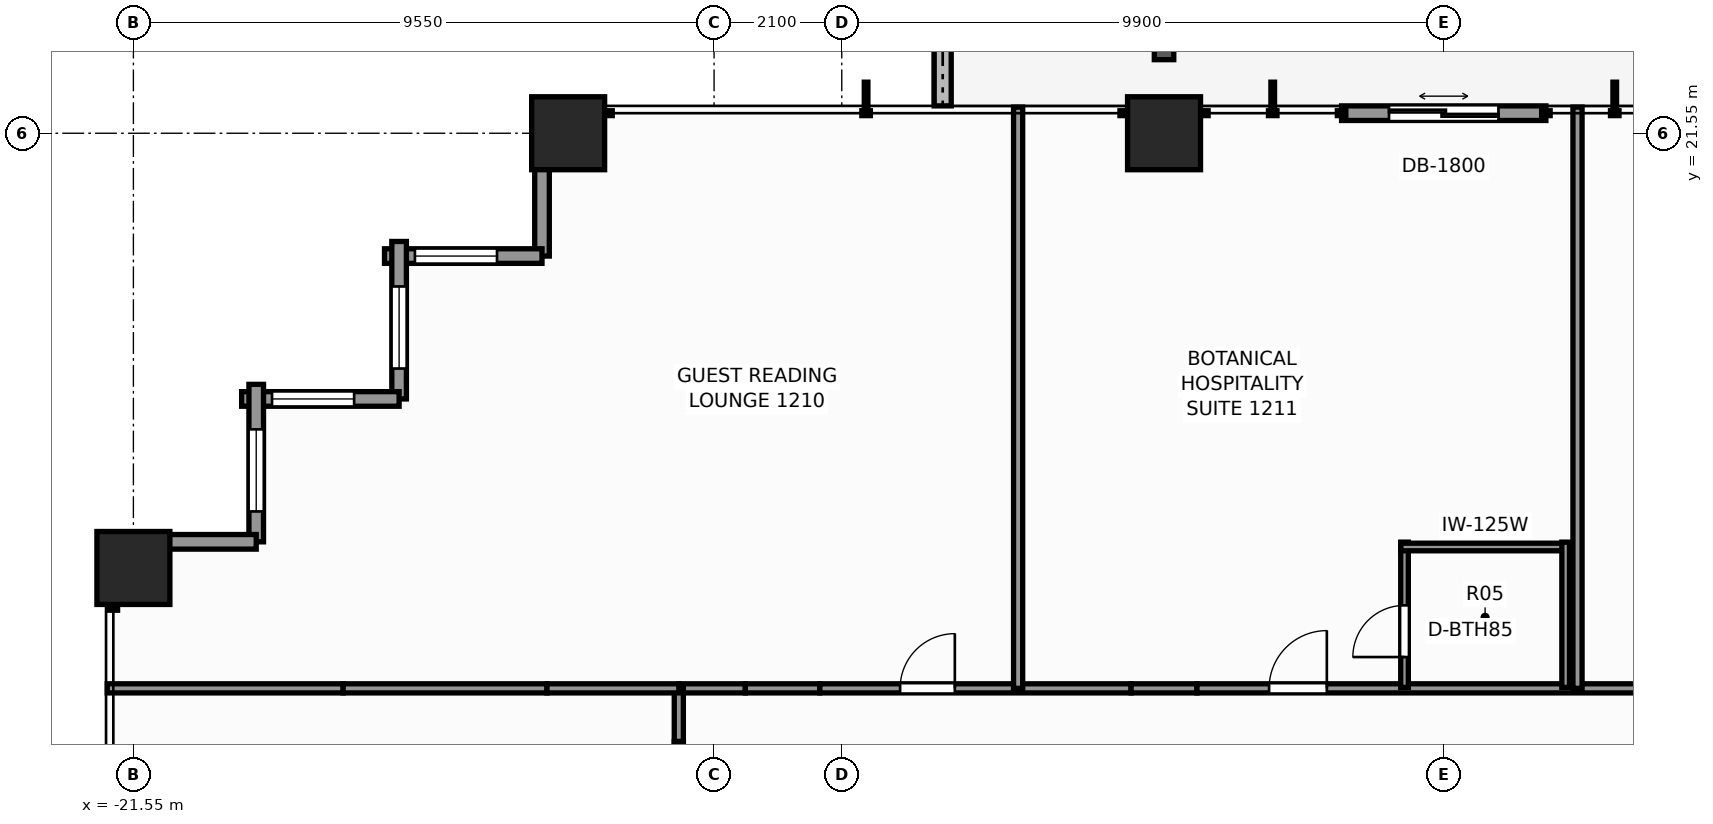
"""IFC4 building model, lengths in metres.
Left out: names, types, materials, properties, quantities, classifications, styles, units other than length and angle.
Written with IfcOpenShell. Run it as: python <this file> out.ifc"""

import sys

from ifc_helpers import new_model, si_unit, direction, frame, frame_2d, origin, origin_2d, place, context, subcontext, project, spatial, rectangle, extrude, element, fill, save


model = new_model("IFC4")
c1 = context("Model", 3, precision=1e-05, world=origin(), true_north=direction((0.0, 1.0)))
c2 = subcontext(c1, "Body", "Model", "MODEL_VIEW")
j1 = project(units=[si_unit("LENGTHUNIT", "METRE"), si_unit("PLANEANGLEUNIT", "RADIAN")], contexts=[c1])
p1 = place(None, origin())
s1 = spatial("IfcSite", under=j1, at=p1, CompositionType="ELEMENT")
p2 = place(p1, origin())
s2 = spatial("IfcBuilding", under=s1, at=p2, CompositionType="ELEMENT")
p3 = place(p2, frame((0.0, 0.0, 43.6)))
s3 = spatial("IfcBuildingStorey", under=s2, at=p3, CompositionType="ELEMENT", Elevation=43.6)
for number, where, z_axis, x_axis in (
    (1, (-14.4, 21.55, 0.0), (0.0, 0.0, 1.0), (1.0, 0.0, 0.0)),
    (2, (-4.6, 21.55, 0.0), (0.0, 0.0, 1.0), (1.0, 0.0, 0.0)),
    (3, (-21.55, 14.4, 0.0), (0.0, 0.0, 1.0), (1.0, 0.0, 0.0)),
):
    element("IfcColumn", number, at=place(p3, frame(where, z_axis=z_axis, x_axis=x_axis)), inside=s3, PredefinedType="COLUMN", context=c2, shape_type="SweptSolid", body=[
        extrude(rectangle(XDim=1.2, YDim=1.2, at=origin_2d()), origin(), (0.0, 0.0, 1.0), 3.3),
    ])
p4 = place(p3, frame((-8.24, 24.975, -0.06), z_axis=(0.0, 0.0, 1.0), x_axis=(0.0, -1.0, 0.0)))
e4 = element("IfcWall", 4, at=p4, inside=s3, PredefinedType="PARAPET", context=c2, shape_type="SweptSolid", body=[
    extrude(rectangle(XDim=2.975, YDim=0.28, at=frame_2d((1.487, 0.0))), origin(), (0.0, 0.0, 1.0), 0.42),
])
p5 = place(p3, frame((-1.68, 21.88, 0.0), z_axis=(0.0, 0.0, 1.0), x_axis=(1.0, 0.0, 0.0)))
e5 = element("IfcWall", 5, at=p5, inside=s3, PredefinedType="STANDARD", context=c2, shape_type="SweptSolid", body=[
    extrude(rectangle(XDim=3.36, YDim=0.24, at=frame_2d((1.68, 0.0))), origin(), (0.0, 0.0, 1.0), 3.06),
])
p6 = place(p5, frame((0.78, 0.0, 0.0)))
e6 = element("IfcOpeningElement", 6, at=p6, cuts=e5, PredefinedType="OPENING", context=c2, shape_type="SweptSolid", body=[
    extrude(rectangle(XDim=1.8, YDim=2.2, at=frame_2d((0.9, 1.1))), frame((0.0, 0.13, 0.0), z_axis=(0.0, -1.0, 0.0), x_axis=(1.0, 0.0, 0.0)), (0.0, 0.0, 1.0), 0.26),
])
p7 = place(p3, frame((-14.83, 19.53, 0.0), z_axis=(0.0, 0.0, 1.0), x_axis=(0.0, 1.0, 0.0)))
e7 = element("IfcWall", 7, at=p7, inside=s3, PredefinedType="STANDARD", context=c2, shape_type="SweptSolid", body=[
    extrude(rectangle(XDim=2.59, YDim=0.24, at=frame_2d((1.295, 0.0))), origin(), (0.0, 0.0, 1.0), 1.555),
])
p8 = place(p3, frame((-17.42, 19.53, 0.0), z_axis=(0.0, 0.0, 1.0), x_axis=(1.0, 0.0, 0.0)))
e8 = element("IfcWall", 8, at=p8, inside=s3, PredefinedType="STANDARD", context=c2, shape_type="SweptSolid", body=[
    extrude(rectangle(XDim=2.59, YDim=0.24, at=frame_2d((1.295, 0.0))), origin(), (0.0, 0.0, 1.0), 2.439),
])
p9 = place(p8, frame((0.5, 0.0, 0.65)))
e9 = element("IfcOpeningElement", 9, at=p9, cuts=e8, PredefinedType="OPENING", context=c2, shape_type="SweptSolid", body=[
    extrude(rectangle(XDim=1.35, YDim=1.55, at=frame_2d((0.675, 0.775))), frame((0.0, 0.13, 0.0), z_axis=(0.0, -1.0, 0.0), x_axis=(1.0, 0.0, 0.0)), (0.0, 0.0, 1.0), 0.26),
])
p10 = place(p3, frame((-17.18, 17.18, 0.0), z_axis=(0.0, 0.0, 1.0), x_axis=(0.0, 1.0, 0.0)))
e10 = element("IfcWall", 10, at=p10, inside=s3, PredefinedType="STANDARD", context=c2, shape_type="SweptSolid", body=[
    extrude(rectangle(XDim=2.59, YDim=0.24, at=frame_2d((1.295, 0.0))), origin(), (0.0, 0.0, 1.0), 2.439),
])
p11 = place(p10, frame((0.5, 0.0, 0.65)))
e11 = element("IfcOpeningElement", 11, at=p11, cuts=e10, PredefinedType="OPENING", context=c2, shape_type="SweptSolid", body=[
    extrude(rectangle(XDim=1.35, YDim=1.55, at=frame_2d((0.675, 0.775))), frame((0.0, 0.13, 0.0), z_axis=(0.0, -1.0, 0.0), x_axis=(1.0, 0.0, 0.0)), (0.0, 0.0, 1.0), 0.26),
])
p12 = place(p3, frame((-19.77, 17.18, 0.0), z_axis=(0.0, 0.0, 1.0), x_axis=(1.0, 0.0, 0.0)))
e12 = element("IfcWall", 12, at=p12, inside=s3, PredefinedType="STANDARD", context=c2, shape_type="SweptSolid", body=[
    extrude(rectangle(XDim=2.59, YDim=0.24, at=frame_2d((1.295, 0.0))), origin(), (0.0, 0.0, 1.0), 2.439),
])
p13 = place(p12, frame((0.5, 0.0, 0.65)))
e13 = element("IfcOpeningElement", 13, at=p13, cuts=e12, PredefinedType="OPENING", context=c2, shape_type="SweptSolid", body=[
    extrude(rectangle(XDim=1.35, YDim=1.55, at=frame_2d((0.675, 0.775))), frame((0.0, 0.13, 0.0), z_axis=(0.0, -1.0, 0.0), x_axis=(1.0, 0.0, 0.0)), (0.0, 0.0, 1.0), 0.26),
])
p14 = place(p3, frame((-19.53, 14.83, 0.0), z_axis=(0.0, 0.0, 1.0), x_axis=(0.0, 1.0, 0.0)))
e14 = element("IfcWall", 14, at=p14, inside=s3, PredefinedType="STANDARD", context=c2, shape_type="SweptSolid", body=[
    extrude(rectangle(XDim=2.59, YDim=0.24, at=frame_2d((1.295, 0.0))), origin(), (0.0, 0.0, 1.0), 2.439),
])
p15 = place(p14, frame((0.5, 0.0, 0.65)))
e15 = element("IfcOpeningElement", 15, at=p15, cuts=e14, PredefinedType="OPENING", context=c2, shape_type="SweptSolid", body=[
    extrude(rectangle(XDim=1.35, YDim=1.55, at=frame_2d((0.675, 0.775))), frame((0.0, 0.13, 0.0), z_axis=(0.0, -1.0, 0.0), x_axis=(1.0, 0.0, 0.0)), (0.0, 0.0, 1.0), 0.26),
])
p16 = place(p3, frame((-22.12, 14.83, 0.0), z_axis=(0.0, 0.0, 1.0), x_axis=(1.0, 0.0, 0.0)))
e16 = element("IfcWall", 16, at=p16, inside=s3, PredefinedType="STANDARD", context=c2, shape_type="SweptSolid", body=[
    extrude(rectangle(XDim=2.59, YDim=0.24, at=frame_2d((1.295, 0.0))), origin(), (0.0, 0.0, 1.0), 1.555),
])
p17 = place(p3, frame((-12.58, 12.42, 0.0), z_axis=(0.0, 0.0, 1.0), x_axis=(1.0, 0.0, 0.0)))
e17 = element("IfcWall", 17, at=p17, inside=s3, PredefinedType="PARTITIONING", context=c2, shape_type="SweptSolid", body=[
    extrude(rectangle(XDim=1.094, YDim=0.15, at=frame_2d((0.547, 0.0))), origin(), (0.0, 0.0, 1.0), 3.06),
])
p18 = place(p3, frame((-11.486, 12.42, 0.0), z_axis=(0.0, 0.0, 1.0), x_axis=(1.0, 0.0, 0.0)))
e18 = element("IfcWall", 18, at=p18, inside=s3, PredefinedType="PARTITIONING", context=c2, shape_type="SweptSolid", body=[
    extrude(rectangle(XDim=1.225, YDim=0.15, at=frame_2d((0.612, 0.0))), origin(), (0.0, 0.0, 1.0), 1.545),
])
p19 = place(p3, frame((-10.261, 12.42, 0.0), z_axis=(0.0, 0.0, 1.0), x_axis=(1.0, 0.0, 0.0)))
e19 = element("IfcWall", 19, at=p19, inside=s3, PredefinedType="PARTITIONING", context=c2, shape_type="SweptSolid", body=[
    extrude(rectangle(XDim=5.119, YDim=0.15, at=frame_2d((2.56, 0.0))), origin(), (0.0, 0.0, 1.0), 3.06),
])
p20 = place(p19, frame((1.32, 0.0, 0.0)))
e20 = element("IfcOpeningElement", 20, at=p20, cuts=e19, PredefinedType="OPENING", context=c2, shape_type="SweptSolid", body=[
    extrude(rectangle(XDim=0.9, YDim=2.06, at=frame_2d((0.45, 1.03))), frame((0.0, 0.085, 0.0), z_axis=(0.0, -1.0, 0.0), x_axis=(1.0, 0.0, 0.0)), (0.0, 0.0, 1.0), 0.17),
])
p21 = place(p3, frame((-5.142, 12.42, 0.0), z_axis=(0.0, 0.0, 1.0), x_axis=(1.0, 0.0, 0.0)))
e21 = element("IfcWall", 21, at=p21, inside=s3, PredefinedType="PARTITIONING", context=c2, shape_type="SweptSolid", body=[
    extrude(rectangle(XDim=1.084, YDim=0.15, at=frame_2d((0.542, 0.0))), origin(), (0.0, 0.0, 1.0), 1.545),
])
p22 = place(p3, frame((-4.058, 12.42, 0.0), z_axis=(0.0, 0.0, 1.0), x_axis=(1.0, 0.0, 0.0)))
e22 = element("IfcWall", 22, at=p22, inside=s3, PredefinedType="PARTITIONING", context=c2, shape_type="SweptSolid", body=[
    extrude(rectangle(XDim=8.116, YDim=0.15, at=frame_2d((4.058, 0.0))), origin(), (0.0, 0.0, 1.0), 2.585),
])
p23 = place(p22, frame((1.186, 0.0, 0.0)))
e23 = element("IfcOpeningElement", 23, at=p23, cuts=e22, PredefinedType="OPENING", context=c2, shape_type="SweptSolid", body=[
    extrude(rectangle(XDim=0.95, YDim=2.06, at=frame_2d((0.475, 1.03))), frame((0.0, 0.085, 0.0), z_axis=(0.0, -1.0, 0.0), x_axis=(1.0, 0.0, 0.0)), (0.0, 0.0, 1.0), 0.17),
])
p24 = place(p3, frame((-12.58, 10.323, 0.0), z_axis=(0.0, 0.0, 1.0), x_axis=(0.0, 1.0, 0.0)))
e24 = element("IfcWall", 24, at=p24, inside=s3, PredefinedType="PARTITIONING", context=c2, shape_type="SweptSolid", body=[
    extrude(rectangle(XDim=1.225, YDim=0.15, at=frame_2d((0.612, 0.0))), origin(), (0.0, 0.0, 1.0), 1.545),
])
p25 = place(p3, frame((-12.58, 11.548, 0.0), z_axis=(0.0, 0.0, 1.0), x_axis=(0.0, 1.0, 0.0)))
e25 = element("IfcWall", 25, at=p25, inside=s3, PredefinedType="PARTITIONING", context=c2, shape_type="SweptSolid", body=[
    extrude(rectangle(XDim=0.872, YDim=0.15, at=frame_2d((0.436, 0.0))), origin(), (0.0, 0.0, 1.0), 3.06),
])
p26 = place(p3, frame((-21.98, 12.42, 0.0), z_axis=(0.0, 0.0, 1.0), x_axis=(1.0, 0.0, 0.0)))
e26 = element("IfcWall", 26, at=p26, inside=s3, PredefinedType="PARTITIONING", context=c2, shape_type="SweptSolid", body=[
    extrude(rectangle(XDim=3.88, YDim=0.15, at=frame_2d((1.94, 0.0))), origin(), (0.0, 0.0, 1.0), 2.429),
])
p27 = place(p3, frame((-18.1, 12.42, 0.0), z_axis=(0.0, 0.0, 1.0), x_axis=(1.0, 0.0, 0.0)))
e27 = element("IfcWall", 27, at=p27, inside=s3, PredefinedType="PARTITIONING", context=c2, shape_type="SweptSolid", body=[
    extrude(rectangle(XDim=3.352, YDim=0.15, at=frame_2d((1.676, 0.0))), origin(), (0.0, 0.0, 1.0), 1.545),
])
p28 = place(p3, frame((-14.748, 12.42, 0.0), z_axis=(0.0, 0.0, 1.0), x_axis=(1.0, 0.0, 0.0)))
e28 = element("IfcWall", 28, at=p28, inside=s3, PredefinedType="PARTITIONING", context=c2, shape_type="SweptSolid", body=[
    extrude(rectangle(XDim=2.168, YDim=0.15, at=frame_2d((1.084, 0.0))), origin(), (0.0, 0.0, 1.0), 3.06),
])
for number, where, z_axis, x_axis in (
    (29, (-7.0, 12.42, 0.0), (0.0, 0.0, 1.0), (0.0, 1.0, 0.0)),
    (30, (2.2, 12.42, 0.0), (0.0, 0.0, 1.0), (0.0, 1.0, 0.0)),
):
    element("IfcWall", number, at=place(p3, frame(where, z_axis=z_axis, x_axis=x_axis)), inside=s3, PredefinedType="PARTITIONING", context=c2, shape_type="SweptSolid", body=[
        extrude(rectangle(XDim=9.56, YDim=0.15, at=frame_2d((4.78, 0.0))), origin(), (0.0, 0.0, 1.0), 2.429),
    ])
p29 = place(p3, frame((-0.645, 12.435, 0.0), z_axis=(0.0, 0.0, 1.0), x_axis=(0.0, 1.0, 0.0)))
e31 = element("IfcWall", 31, at=p29, inside=s3, PredefinedType="PARTITIONING", context=c2, shape_type="SweptSolid", body=[
    extrude(rectangle(XDim=2.39, YDim=0.125, at=frame_2d((1.195, 0.0))), origin(), (0.0, 0.0, 1.0), 3.06),
])
p30 = place(p29, frame((0.5, 0.0, 0.0)))
e32 = element("IfcOpeningElement", 32, at=p30, cuts=e31, PredefinedType="OPENING", context=c2, shape_type="SweptSolid", body=[
    extrude(rectangle(XDim=0.85, YDim=2.03, at=frame_2d((0.425, 1.015))), frame((0.0, 0.073, 0.0), z_axis=(0.0, -1.0, 0.0), x_axis=(1.0, 0.0, 0.0)), (0.0, 0.0, 1.0), 0.145),
])
p31 = place(p3, frame((-0.705, 14.745, 0.0), z_axis=(0.0, 0.0, 1.0), x_axis=(1.0, 0.0, 0.0)))
e33 = element("IfcWall", 33, at=p31, inside=s3, PredefinedType="PARTITIONING", context=c2, shape_type="SweptSolid", body=[
    extrude(rectangle(XDim=2.77, YDim=0.125, at=frame_2d((1.385, 0.0))), origin(), (0.0, 0.0, 1.0), 2.585),
])
p32 = place(p3, frame((2.005, 12.435, 0.0), z_axis=(0.0, 0.0, 1.0), x_axis=(0.0, 1.0, 0.0)))
e34 = element("IfcWall", 34, at=p32, inside=s3, PredefinedType="PARTITIONING", context=c2, shape_type="SweptSolid", body=[
    extrude(rectangle(XDim=2.39, YDim=0.125, at=frame_2d((1.195, 0.0))), origin(), (0.0, 0.0, 1.0), 3.06),
])
p33 = place(p6, origin())
e35 = element("IfcDoor", 35, at=p33, inside=s3, OperationType="DOUBLE_DOOR_SLIDING", PredefinedType="DOOR", context=c2, shape_type="SweptSolid", body=[
    extrude(rectangle(XDim=1.8, YDim=2.2, at=frame_2d((0.9, 1.1))), frame((0.0, 0.025, 0.0), z_axis=(0.0, -1.0, 0.0), x_axis=(1.0, 0.0, 0.0)), (0.0, 0.0, 1.0), 0.05),
])
fill(e6, e35)
p34 = place(p9, origin())
e36 = element("IfcWindow", 36, at=p34, inside=s3, PartitioningType="SINGLE_PANEL", PredefinedType="WINDOW", context=c2, shape_type="SweptSolid", body=[
    extrude(rectangle(XDim=1.35, YDim=1.55, at=frame_2d((0.675, 0.775))), frame((0.0, 0.03, 0.0), z_axis=(0.0, -1.0, 0.0), x_axis=(1.0, 0.0, 0.0)), (0.0, 0.0, 1.0), 0.06),
])
fill(e9, e36)
p35 = place(p11, origin())
e37 = element("IfcWindow", 37, at=p35, inside=s3, PartitioningType="SINGLE_PANEL", PredefinedType="WINDOW", context=c2, shape_type="SweptSolid", body=[
    extrude(rectangle(XDim=1.35, YDim=1.55, at=frame_2d((0.675, 0.775))), frame((0.0, 0.03, 0.0), z_axis=(0.0, -1.0, 0.0), x_axis=(1.0, 0.0, 0.0)), (0.0, 0.0, 1.0), 0.06),
])
fill(e11, e37)
p36 = place(p13, origin())
e38 = element("IfcWindow", 38, at=p36, inside=s3, PartitioningType="SINGLE_PANEL", PredefinedType="WINDOW", context=c2, shape_type="SweptSolid", body=[
    extrude(rectangle(XDim=1.35, YDim=1.55, at=frame_2d((0.675, 0.775))), frame((0.0, 0.03, 0.0), z_axis=(0.0, -1.0, 0.0), x_axis=(1.0, 0.0, 0.0)), (0.0, 0.0, 1.0), 0.06),
])
fill(e13, e38)
p37 = place(p15, origin())
e39 = element("IfcWindow", 39, at=p37, inside=s3, PartitioningType="SINGLE_PANEL", PredefinedType="WINDOW", context=c2, shape_type="SweptSolid", body=[
    extrude(rectangle(XDim=1.35, YDim=1.55, at=frame_2d((0.675, 0.775))), frame((0.0, 0.03, 0.0), z_axis=(0.0, -1.0, 0.0), x_axis=(1.0, 0.0, 0.0)), (0.0, 0.0, 1.0), 0.06),
])
fill(e15, e39)
p38 = place(p20, origin())
e40 = element("IfcDoor", 40, at=p38, inside=s3, OperationType="SINGLE_SWING_RIGHT", PredefinedType="DOOR", context=c2, shape_type="SweptSolid", body=[
    extrude(rectangle(XDim=0.9, YDim=2.06, at=frame_2d((0.45, 1.03))), frame((0.0, 0.025, 0.0), z_axis=(0.0, -1.0, 0.0), x_axis=(1.0, 0.0, 0.0)), (0.0, 0.0, 1.0), 0.05),
])
fill(e20, e40)
p39 = place(p30, origin())
e41 = element("IfcDoor", 41, at=p39, inside=s3, OperationType="SINGLE_SWING_LEFT", PredefinedType="DOOR", context=c2, shape_type="SweptSolid", body=[
    extrude(rectangle(XDim=0.85, YDim=2.03, at=frame_2d((0.425, 1.015))), frame((0.0, 0.025, 0.0), z_axis=(0.0, -1.0, 0.0), x_axis=(1.0, 0.0, 0.0)), (0.0, 0.0, 1.0), 0.05),
])
fill(e32, e41)
p40 = place(p23, origin())
e42 = element("IfcDoor", 42, at=p40, inside=s3, OperationType="SINGLE_SWING_RIGHT", PredefinedType="DOOR", context=c2, shape_type="SweptSolid", body=[
    extrude(rectangle(XDim=0.95, YDim=2.06, at=frame_2d((0.475, 1.03))), frame((0.0, 0.025, 0.0), z_axis=(0.0, -1.0, 0.0), x_axis=(1.0, 0.0, 0.0)), (0.0, 0.0, 1.0), 0.05),
])
fill(e23, e42)
save(model, sys.argv[1])
